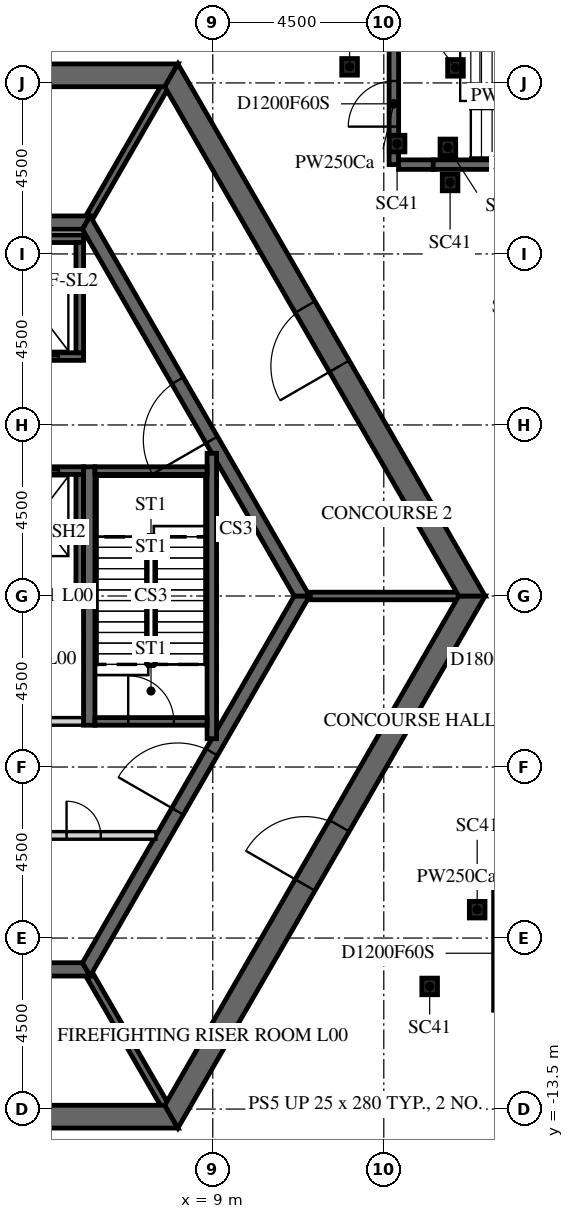
"""IFC4 building model, lengths in metres.
Left out: names, types, materials, properties, quantities, classifications, styles, units other than length and angle.
Written with IfcOpenShell. Run it as: python <this file> out.ifc"""

import sys

from ifc_helpers import new_model, si_unit, direction, frame, frame_2d, origin, origin_2d, place, context, subcontext, project, spatial, polyline, rectangle, i_section, outline, extrude, element, fill, save


model = new_model("IFC4")
c1 = context("Model", 3, precision=1e-05, world=origin(), true_north=direction((0.0, 1.0)))
c2 = subcontext(c1, "Body", "Model", "MODEL_VIEW")
j1 = project(units=[si_unit("LENGTHUNIT", "METRE"), si_unit("PLANEANGLEUNIT", "RADIAN")], contexts=[c1])
p1 = place(None, origin())
s1 = spatial("IfcSite", under=j1, at=p1, CompositionType="ELEMENT")
p2 = place(p1, origin())
s2 = spatial("IfcBuilding", under=s1, at=p2, CompositionType="ELEMENT")
p3 = place(p2, origin())
s3 = spatial("IfcBuildingStorey", under=s2, at=p3, CompositionType="ELEMENT", Elevation=0.0)
for number, where, z_axis, x_axis in (
    (1, (15.957, -8.254, -2.1), (0.0, 0.0, 1.0), (1.0, 0.0, 0.0)),
    (2, (14.707, -10.273, -2.1), (0.0, 0.0, 1.0), (1.0, 0.0, 0.0)),
    (3, (12.6, 13.923, -2.1), (0.0, 0.0, 1.0), (1.0, 0.0, 0.0)),
    (4, (13.85, 11.904, -2.1), (0.0, 0.0, 1.0), (1.0, 0.0, 0.0)),
    (5, (15.186, 11.804, -2.1), (0.0, 0.0, 1.0), (1.0, 0.0, 0.0)),
    (6, (15.386, 13.896, -2.1), (0.0, 0.0, 1.0), (1.0, 0.0, 0.0)),
    (7, (15.245, 10.88, -2.1), (0.0, 0.0, 1.0), (1.0, 0.0, 0.0)),
):
    element("IfcColumn", number, at=place(p3, frame(where, z_axis=z_axis, x_axis=x_axis)), inside=s3, PredefinedType="COLUMN", context=c2, shape_type="SweptSolid", body=[
        extrude(i_section(OverallWidth=0.412, OverallDepth=0.437, WebThickness=0.036, FlangeThickness=0.058, FilletRadius=0.015, at=origin_2d()), origin(), (0.0, 0.0, 1.0), 10.85),
    ])
p4 = place(p3, frame((-7.91, -13.7, -2.1), z_axis=(0.0, 0.0, 1.0), x_axis=(1.0, 0.0, 0.0)))
e8 = element("IfcWall", 8, at=p4, inside=s3, PredefinedType="SHEAR", context=c2, shape_type="SweptSolid", body=[
    extrude(outline(polyline([(-0.173, -0.3), (15.993, -0.3), (15.646, 0.3), (0.173, 0.3), (-0.173, -0.3)])), origin(), (0.0, 0.0, 1.0), 10.85),
])
p5 = place(p4, frame((7.31, 0.0, 2.1)))
e9 = element("IfcOpeningElement", 9, at=p5, cuts=e8, PredefinedType="OPENING", context=c2, shape_type="SweptSolid", body=[
    extrude(rectangle(XDim=1.2, YDim=2.4, at=frame_2d((0.6, 1.2))), frame((0.0, 0.31, 0.0), z_axis=(0.0, -1.0, 0.0), x_axis=(1.0, 0.0, 0.0)), (0.0, 0.0, 1.0), 0.62),
])
p6 = place(p3, frame((7.91, -13.7, -2.1), z_axis=(0.0, 0.0, 1.0), x_axis=(0.499999880136, 0.866025472988, 0.0)))
e10 = element("IfcWall", 10, at=p6, inside=s3, PredefinedType="SHEAR", context=c2, shape_type="SweptSolid", body=[
    extrude(outline(polyline([(-0.173, -0.3), (15.993, -0.3), (15.646, 0.3), (0.173, 0.3), (-0.173, -0.3)])), origin(), (0.0, 0.0, 1.0), 10.85),
])
p7 = place(p6, frame((7.039, 0.0, 2.1)))
e11 = element("IfcOpeningElement", 11, at=p7, cuts=e10, PredefinedType="OPENING", context=c2, shape_type="SweptSolid", body=[
    extrude(rectangle(XDim=1.8, YDim=2.4, at=frame_2d((0.9, 1.2))), frame((0.0, 0.31, 0.0), z_axis=(0.0, -1.0, 0.0), x_axis=(1.0, 0.0, 0.0)), (0.0, 0.0, 1.0), 0.62),
])
p8 = place(p3, frame((15.819, 0.0, -2.1), z_axis=(0.0, 0.0, 1.0), x_axis=(-0.499999880136, 0.866025472988, 0.0)))
e12 = element("IfcWall", 12, at=p8, inside=s3, PredefinedType="SHEAR", context=c2, shape_type="SweptSolid", body=[
    extrude(outline(polyline([(-0.173, -0.3), (15.993, -0.3), (15.646, 0.3), (0.173, 0.3), (-0.173, -0.3)])), origin(), (0.0, 0.0, 1.0), 10.85),
])
p9 = place(p8, frame((6.981, 0.0, 2.1)))
e13 = element("IfcOpeningElement", 13, at=p9, cuts=e12, PredefinedType="OPENING", context=c2, shape_type="SweptSolid", body=[
    extrude(rectangle(XDim=1.8, YDim=2.4, at=frame_2d((0.9, 1.2))), frame((0.0, 0.31, 0.0), z_axis=(0.0, -1.0, 0.0), x_axis=(1.0, 0.0, 0.0)), (0.0, 0.0, 1.0), 0.62),
])
p10 = place(p3, frame((7.91, 13.7, -2.1), z_axis=(0.0, 0.0, 1.0), x_axis=(-1.0, 0.0, 0.0)))
e14 = element("IfcWall", 14, at=p10, inside=s3, PredefinedType="SHEAR", context=c2, shape_type="SweptSolid", body=[
    extrude(outline(polyline([(-0.173, -0.3), (15.993, -0.3), (15.646, 0.3), (0.173, 0.3), (-0.173, -0.3)])), origin(), (0.0, 0.0, 1.0), 10.85),
])
p11 = place(p10, frame((7.31, 0.0, 2.1)))
e15 = element("IfcOpeningElement", 15, at=p11, cuts=e14, PredefinedType="OPENING", context=c2, shape_type="SweptSolid", body=[
    extrude(rectangle(XDim=1.2, YDim=2.4, at=frame_2d((0.6, 1.2))), frame((0.0, 0.31, 0.0), z_axis=(0.0, -1.0, 0.0), x_axis=(1.0, 0.0, 0.0)), (0.0, 0.0, 1.0), 0.62),
])
p12 = place(p3, frame((-5.673, -9.825, -2.1), z_axis=(0.0, 0.0, 1.0), x_axis=(1.0, 0.0, 0.0)))
e16 = element("IfcWall", 16, at=p12, inside=s3, PredefinedType="SHEAR", context=c2, shape_type="SweptSolid", body=[
    extrude(outline(polyline([(-0.101, -0.175), (11.446, -0.175), (11.244, 0.175), (0.101, 0.175), (-0.101, -0.175)])), origin(), (0.0, 0.0, 1.0), 10.85),
])
p13 = place(p3, frame((5.673, -9.825, -2.1), z_axis=(0.0, 0.0, 1.0), x_axis=(0.499995046907, 0.866028263435, 0.0)))
e17 = element("IfcWall", 17, at=p13, inside=s3, PredefinedType="SHEAR", context=c2, shape_type="SweptSolid", body=[
    extrude(outline(polyline([(-0.101, -0.175), (11.446, -0.175), (11.244, 0.175), (0.101, 0.175), (-0.101, -0.175)])), origin(), (0.0, 0.0, 1.0), 10.85),
])
p14 = place(p13, frame((4.801, 0.0, 2.1)))
e18 = element("IfcOpeningElement", 18, at=p14, cuts=e17, PredefinedType="OPENING", context=c2, shape_type="SweptSolid", body=[
    extrude(rectangle(XDim=1.8, YDim=2.4, at=frame_2d((0.9, 1.2))), frame((0.0, 0.185, 0.0), z_axis=(0.0, -1.0, 0.0), x_axis=(1.0, 0.0, 0.0)), (0.0, 0.0, 1.0), 0.37),
])
p15 = place(p3, frame((11.345, 0.0, -2.1), z_axis=(0.0, 0.0, 1.0), x_axis=(-0.499995046907, 0.866028263435, 0.0)))
e19 = element("IfcWall", 19, at=p15, inside=s3, PredefinedType="SHEAR", context=c2, shape_type="SweptSolid", body=[
    extrude(outline(polyline([(-0.101, -0.175), (11.446, -0.175), (11.244, 0.175), (0.101, 0.175), (-0.101, -0.175)])), origin(), (0.0, 0.0, 1.0), 10.85),
])
p16 = place(p15, frame((4.744, 0.0, 2.1)))
e20 = element("IfcOpeningElement", 20, at=p16, cuts=e19, PredefinedType="OPENING", context=c2, shape_type="SweptSolid", body=[
    extrude(rectangle(XDim=1.8, YDim=2.4, at=frame_2d((0.9, 1.2))), frame((0.0, 0.185, 0.0), z_axis=(0.0, -1.0, 0.0), x_axis=(1.0, 0.0, 0.0)), (0.0, 0.0, 1.0), 0.37),
])
p17 = place(p3, frame((5.673, 9.825, -2.1), z_axis=(0.0, 0.0, 1.0), x_axis=(-1.0, 0.0, 0.0)))
e21 = element("IfcWall", 21, at=p17, inside=s3, PredefinedType="SHEAR", context=c2, shape_type="SweptSolid", body=[
    extrude(outline(polyline([(-0.101, -0.175), (11.446, -0.175), (11.244, 0.175), (0.101, 0.175), (-0.101, -0.175)])), origin(), (0.0, 0.0, 1.0), 10.85),
])
p18 = place(p3, frame((-5.6, 6.3, -2.1), z_axis=(0.0, 0.0, 1.0), x_axis=(1.0, 0.0, 0.0)))
e22 = element("IfcWall", 22, at=p18, inside=s3, PredefinedType="SHEAR", context=c2, shape_type="SweptSolid", body=[
    extrude(rectangle(XDim=11.2, YDim=0.2, at=frame_2d((5.6, 0.0))), origin(), (0.0, 0.0, 1.0), 10.85),
])
p19 = place(p18, frame((0.65, 0.0, 2.1)))
e23 = element("IfcOpeningElement", 23, at=p19, cuts=e22, PredefinedType="OPENING", context=c2, shape_type="SweptSolid", body=[
    extrude(rectangle(XDim=1.1, YDim=2.1, at=frame_2d((0.55, 1.05))), frame((0.0, 0.11, 0.0), z_axis=(0.0, -1.0, 0.0), x_axis=(1.0, 0.0, 0.0)), (0.0, 0.0, 1.0), 0.22),
])
p20 = place(p18, frame((2.85, 0.0, 2.1)))
e24 = element("IfcOpeningElement", 24, at=p20, cuts=e22, PredefinedType="OPENING", context=c2, shape_type="SweptSolid", body=[
    extrude(rectangle(XDim=1.1, YDim=2.1, at=frame_2d((0.55, 1.05))), frame((0.0, 0.11, 0.0), z_axis=(0.0, -1.0, 0.0), x_axis=(1.0, 0.0, 0.0)), (0.0, 0.0, 1.0), 0.22),
])
p21 = place(p18, frame((5.05, 0.0, 2.1)))
e25 = element("IfcOpeningElement", 25, at=p21, cuts=e22, PredefinedType="OPENING", context=c2, shape_type="SweptSolid", body=[
    extrude(rectangle(XDim=1.1, YDim=2.1, at=frame_2d((0.55, 1.05))), frame((0.0, 0.11, 0.0), z_axis=(0.0, -1.0, 0.0), x_axis=(1.0, 0.0, 0.0)), (0.0, 0.0, 1.0), 0.22),
])
p22 = place(p18, frame((7.25, 0.0, 2.1)))
e26 = element("IfcOpeningElement", 26, at=p22, cuts=e22, PredefinedType="OPENING", context=c2, shape_type="SweptSolid", body=[
    extrude(rectangle(XDim=1.1, YDim=2.1, at=frame_2d((0.55, 1.05))), frame((0.0, 0.11, 0.0), z_axis=(0.0, -1.0, 0.0), x_axis=(1.0, 0.0, 0.0)), (0.0, 0.0, 1.0), 0.22),
])
p23 = place(p18, frame((9.45, 0.0, 2.1)))
e27 = element("IfcOpeningElement", 27, at=p23, cuts=e22, PredefinedType="OPENING", context=c2, shape_type="SweptSolid", body=[
    extrude(rectangle(XDim=1.1, YDim=2.1, at=frame_2d((0.55, 1.05))), frame((0.0, 0.11, 0.0), z_axis=(0.0, -1.0, 0.0), x_axis=(1.0, 0.0, 0.0)), (0.0, 0.0, 1.0), 0.22),
])
p24 = place(p3, frame((-5.6, 9.4, -2.1), z_axis=(0.0, 0.0, 1.0), x_axis=(1.0, 0.0, 0.0)))
e28 = element("IfcWall", 28, at=p24, inside=s3, PredefinedType="SHEAR", context=c2, shape_type="SweptSolid", body=[
    extrude(rectangle(XDim=11.2, YDim=0.2, at=frame_2d((5.6, 0.0))), origin(), (0.0, 0.0, 1.0), 10.85),
])
p25 = place(p3, frame((5.5, 6.4, -2.1), z_axis=(0.0, 0.0, 1.0), x_axis=(0.0, 1.0, 0.0)))
e29 = element("IfcWall", 29, at=p25, inside=s3, PredefinedType="SHEAR", context=c2, shape_type="SweptSolid", body=[
    extrude(rectangle(XDim=2.9, YDim=0.2, at=frame_2d((1.45, 0.0))), origin(), (0.0, 0.0, 1.0), 10.85),
])
p26 = place(p3, frame((-5.6, 3.3, -2.1), z_axis=(0.0, 0.0, 1.0), x_axis=(1.0, 0.0, 0.0)))
e30 = element("IfcWall", 30, at=p26, inside=s3, PredefinedType="SHEAR", context=c2, shape_type="SweptSolid", body=[
    extrude(rectangle(XDim=11.2, YDim=0.2, at=frame_2d((5.6, 0.0))), origin(), (0.0, 0.0, 1.0), 10.85),
])
p27 = place(p26, frame((0.65, 0.0, 2.1)))
e31 = element("IfcOpeningElement", 31, at=p27, cuts=e30, PredefinedType="OPENING", context=c2, shape_type="SweptSolid", body=[
    extrude(rectangle(XDim=1.1, YDim=2.1, at=frame_2d((0.55, 1.05))), frame((0.0, 0.11, 0.0), z_axis=(0.0, -1.0, 0.0), x_axis=(1.0, 0.0, 0.0)), (0.0, 0.0, 1.0), 0.22),
])
p28 = place(p26, frame((2.85, 0.0, 2.1)))
e32 = element("IfcOpeningElement", 32, at=p28, cuts=e30, PredefinedType="OPENING", context=c2, shape_type="SweptSolid", body=[
    extrude(rectangle(XDim=1.1, YDim=2.1, at=frame_2d((0.55, 1.05))), frame((0.0, 0.11, 0.0), z_axis=(0.0, -1.0, 0.0), x_axis=(1.0, 0.0, 0.0)), (0.0, 0.0, 1.0), 0.22),
])
p29 = place(p26, frame((5.05, 0.0, 2.1)))
e33 = element("IfcOpeningElement", 33, at=p29, cuts=e30, PredefinedType="OPENING", context=c2, shape_type="SweptSolid", body=[
    extrude(rectangle(XDim=1.1, YDim=2.1, at=frame_2d((0.55, 1.05))), frame((0.0, 0.11, 0.0), z_axis=(0.0, -1.0, 0.0), x_axis=(1.0, 0.0, 0.0)), (0.0, 0.0, 1.0), 0.22),
])
p30 = place(p26, frame((7.25, 0.0, 2.1)))
e34 = element("IfcOpeningElement", 34, at=p30, cuts=e30, PredefinedType="OPENING", context=c2, shape_type="SweptSolid", body=[
    extrude(rectangle(XDim=1.1, YDim=2.1, at=frame_2d((0.55, 1.05))), frame((0.0, 0.11, 0.0), z_axis=(0.0, -1.0, 0.0), x_axis=(1.0, 0.0, 0.0)), (0.0, 0.0, 1.0), 0.22),
])
p31 = place(p26, frame((9.45, 0.0, 2.1)))
e35 = element("IfcOpeningElement", 35, at=p31, cuts=e30, PredefinedType="OPENING", context=c2, shape_type="SweptSolid", body=[
    extrude(rectangle(XDim=1.1, YDim=2.1, at=frame_2d((0.55, 1.05))), frame((0.0, 0.11, 0.0), z_axis=(0.0, -1.0, 0.0), x_axis=(1.0, 0.0, 0.0)), (0.0, 0.0, 1.0), 0.22),
])
p32 = place(p3, frame((-5.6, 0.0, -2.1), z_axis=(0.0, 0.0, 1.0), x_axis=(1.0, 0.0, 0.0)))
e36 = element("IfcWall", 36, at=p32, inside=s3, PredefinedType="SHEAR", context=c2, shape_type="SweptSolid", body=[
    extrude(rectangle(XDim=11.2, YDim=0.2, at=frame_2d((5.6, 0.0))), origin(), (0.0, 0.0, 1.0), 10.85),
])
p33 = place(p3, frame((5.5, 0.1, -2.1), z_axis=(0.0, 0.0, 1.0), x_axis=(0.0, 1.0, 0.0)))
e37 = element("IfcWall", 37, at=p33, inside=s3, PredefinedType="SHEAR", context=c2, shape_type="SweptSolid", body=[
    extrude(rectangle(XDim=3.1, YDim=0.2, at=frame_2d((1.55, 0.0))), origin(), (0.0, 0.0, 1.0), 10.85),
])
p34 = place(p3, frame((0.1, -3.3, 0.0), z_axis=(0.0, 0.0, 1.0), x_axis=(1.0, 0.0, 0.0)))
e38 = element("IfcWall", 38, at=p34, inside=s3, PredefinedType="PARTITIONING", context=c2, shape_type="SweptSolid", body=[
    extrude(rectangle(XDim=5.5, YDim=0.2, at=frame_2d((2.75, 0.0))), origin(), (0.0, 0.0, 1.0), 8.75),
])
p35 = place(p34, frame((2.3, 0.0, 0.0)))
e39 = element("IfcOpeningElement", 39, at=p35, cuts=e38, PredefinedType="OPENING", context=c2, shape_type="SweptSolid", body=[
    extrude(rectangle(XDim=0.9, YDim=2.1, at=frame_2d((0.45, 1.05))), frame((0.0, 0.11, 0.0), z_axis=(0.0, -1.0, 0.0), x_axis=(1.0, 0.0, 0.0)), (0.0, 0.0, 1.0), 0.22),
])
p36 = place(p3, frame((3.7, -6.3, 0.0), z_axis=(0.0, 0.0, 1.0), x_axis=(1.0, 0.0, 0.0)))
e40 = element("IfcWall", 40, at=p36, inside=s3, PredefinedType="PARTITIONING", context=c2, shape_type="SweptSolid", body=[
    extrude(rectangle(XDim=3.806, YDim=0.2, at=frame_2d((1.903, 0.0))), origin(), (0.0, 0.0, 1.0), 8.75),
])
p37 = place(p36, frame((1.453, 0.0, 0.0)))
e41 = element("IfcOpeningElement", 41, at=p37, cuts=e40, PredefinedType="OPENING", context=c2, shape_type="SweptSolid", body=[
    extrude(rectangle(XDim=0.9, YDim=2.1, at=frame_2d((0.45, 1.05))), frame((0.0, 0.11, 0.0), z_axis=(0.0, -1.0, 0.0), x_axis=(1.0, 0.0, 0.0)), (0.0, 0.0, 1.0), 0.22),
])
p38 = place(p3, frame((11.547, 0.0, -2.1), z_axis=(0.0, 0.0, 1.0), x_axis=(1.0, 0.0, 0.0)))
e42 = element("IfcWall", 42, at=p38, inside=s3, PredefinedType="SHEAR", context=c2, shape_type="SweptSolid", body=[
    extrude(rectangle(XDim=3.926, YDim=0.2, at=frame_2d((1.963, 0.0))), origin(), (0.0, 0.0, 1.0), 10.85),
])
for number, where, z_axis, x_axis in (
    (43, (5.773, 10.0, -2.1), (0.0, 0.0, 1.0), (0.5, 0.866, 0.0)),
    (44, (5.773, -10.0, -2.1), (0.0, 0.0, 1.0), (0.5, -0.866, 0.0)),
):
    element("IfcWall", number, at=place(p3, frame(where, z_axis=z_axis, x_axis=x_axis)), inside=s3, PredefinedType="SHEAR", context=c2, shape_type="SweptSolid", body=[
        extrude(rectangle(XDim=3.926, YDim=0.2, at=frame_2d((1.963, 0.0))), origin(), (0.0, 0.0, 1.0), 10.85),
    ])
p39 = place(p3, frame((5.75, -3.4, -2.1), z_axis=(0.0, 0.0, 1.0), x_axis=(0.0, 1.0, 0.0)))
e45 = element("IfcWall", 45, at=p39, inside=s3, PredefinedType="SHEAR", context=c2, shape_type="SweptSolid", body=[
    extrude(rectangle(XDim=6.8, YDim=0.3, at=frame_2d((3.4, 0.0))), origin(), (0.0, 0.0, 1.0), 10.85),
])
p40 = place(p3, frame((8.975, -3.755, -2.1), z_axis=(0.0, 0.0, 1.0), x_axis=(0.0, 1.0, 0.0)))
e46 = element("IfcWall", 46, at=p40, inside=s3, PredefinedType="SHEAR", context=c2, shape_type="SweptSolid", body=[
    extrude(rectangle(XDim=7.51, YDim=0.25, at=frame_2d((3.755, 0.0))), origin(), (0.0, 0.0, 1.0), 10.85),
])
p41 = place(p3, frame((5.9, 3.3, -2.1), z_axis=(0.0, 0.0, 1.0), x_axis=(1.0, 0.0, 0.0)))
e47 = element("IfcWall", 47, at=p41, inside=s3, PredefinedType="SHEAR", context=c2, shape_type="SweptSolid", body=[
    extrude(rectangle(XDim=2.95, YDim=0.2, at=frame_2d((1.475, 0.0))), origin(), (0.0, 0.0, 1.0), 10.85),
])
p42 = place(p3, frame((5.9, -3.3, -2.1), z_axis=(0.0, 0.0, 1.0), x_axis=(1.0, 0.0, 0.0)))
e48 = element("IfcWall", 48, at=p42, inside=s3, PredefinedType="SHEAR", context=c2, shape_type="SweptSolid", body=[
    extrude(rectangle(XDim=2.95, YDim=0.2, at=frame_2d((1.475, 0.0))), origin(), (0.0, 0.0, 1.0), 10.85),
])
p43 = place(p42, frame((0.875, 0.0, 2.1)))
e49 = element("IfcOpeningElement", 49, at=p43, cuts=e48, PredefinedType="OPENING", context=c2, shape_type="SweptSolid", body=[
    extrude(rectangle(XDim=1.2, YDim=2.4, at=frame_2d((0.6, 1.2))), frame((0.0, 0.11, 0.0), z_axis=(0.0, -1.0, 0.0), x_axis=(1.0, 0.0, 0.0)), (0.0, 0.0, 1.0), 0.22),
])
p44 = place(p3, frame((13.765, 11.35, 0.0), z_axis=(0.0, 0.0, 1.0), x_axis=(0.0, 1.0, 0.0)))
e50 = element("IfcWall", 50, at=p44, inside=s3, PredefinedType="PARTITIONING", context=c2, shape_type="SweptSolid", body=[
    extrude(rectangle(XDim=3.2, YDim=0.25, at=frame_2d((1.6, 0.0))), origin(), (0.0, 0.0, 1.0), 8.75),
])
p45 = place(p44, frame((1.0, 0.0, 0.0)))
e51 = element("IfcOpeningElement", 51, at=p45, cuts=e50, PredefinedType="OPENING", context=c2, shape_type="SweptSolid", body=[
    extrude(rectangle(XDim=1.2, YDim=2.1, at=frame_2d((0.6, 1.05))), frame((0.0, 0.135, 0.0), z_axis=(0.0, -1.0, 0.0), x_axis=(1.0, 0.0, 0.0)), (0.0, 0.0, 1.0), 0.27),
])
p46 = place(p3, frame((14.821, 11.35, 0.0), z_axis=(0.0, 0.0, 1.0), x_axis=(-1.0, 0.0, 0.0)))
e52 = element("IfcWall", 52, at=p46, inside=s3, PredefinedType="PARTITIONING", context=c2, shape_type="SweptSolid", body=[
    extrude(rectangle(XDim=0.931, YDim=0.25, at=frame_2d((0.466, 0.0))), origin(), (0.0, 0.0, 1.0), 8.75),
])
p47 = place(p3, frame((16.515, -7.7, 0.0), z_axis=(0.0, 0.0, 1.0), x_axis=(0.0, -1.0, 0.0)))
e53 = element("IfcWall", 53, at=p47, inside=s3, PredefinedType="PARTITIONING", context=c2, shape_type="SweptSolid", body=[
    extrude(rectangle(XDim=3.2, YDim=0.25, at=frame_2d((1.6, 0.0))), origin(), (0.0, 0.0, 1.0), 8.75),
])
p48 = place(p47, frame((1.1, 0.0, 0.0)))
e54 = element("IfcOpeningElement", 54, at=p48, cuts=e53, PredefinedType="OPENING", context=c2, shape_type="SweptSolid", body=[
    extrude(rectangle(XDim=1.2, YDim=2.1, at=frame_2d((0.6, 1.05))), frame((0.0, 0.135, 0.0), z_axis=(0.0, -1.0, 0.0), x_axis=(1.0, 0.0, 0.0)), (0.0, 0.0, 1.0), 0.27),
])
p49 = place(p3, frame((20.017, 11.35, 0.0), z_axis=(0.0, 0.0, 1.0), x_axis=(-1.0, 0.0, 0.0)))
e55 = element("IfcWall", 55, at=p49, inside=s3, PredefinedType="PARTITIONING", context=c2, shape_type="SweptSolid", body=[
    extrude(rectangle(XDim=5.218, YDim=0.25, at=frame_2d((2.609, 0.0))), origin(), (0.0, 0.0, 1.0), 8.75),
])
p50 = place(p9, origin())
e56 = element("IfcDoor", 56, at=p50, inside=s3, OperationType="DOUBLE_DOOR_SINGLE_SWING", PredefinedType="DOOR", context=c2, shape_type="SweptSolid", body=[
    extrude(rectangle(XDim=1.8, YDim=2.4, at=frame_2d((0.9, 1.2))), frame((0.0, 0.025, 0.0), z_axis=(0.0, -1.0, 0.0), x_axis=(1.0, 0.0, 0.0)), (0.0, 0.0, 1.0), 0.05),
])
fill(e13, e56)
p51 = place(p7, origin())
e57 = element("IfcDoor", 57, at=p51, inside=s3, OperationType="DOUBLE_DOOR_SINGLE_SWING", PredefinedType="DOOR", context=c2, shape_type="SweptSolid", body=[
    extrude(rectangle(XDim=1.8, YDim=2.4, at=frame_2d((0.9, 1.2))), frame((0.0, 0.025, 0.0), z_axis=(0.0, -1.0, 0.0), x_axis=(1.0, 0.0, 0.0)), (0.0, 0.0, 1.0), 0.05),
])
fill(e11, e57)
p52 = place(p16, origin())
e58 = element("IfcDoor", 58, at=p52, inside=s3, OperationType="DOUBLE_DOOR_SINGLE_SWING", PredefinedType="DOOR", context=c2, shape_type="SweptSolid", body=[
    extrude(rectangle(XDim=1.8, YDim=2.4, at=frame_2d((0.9, 1.2))), frame((0.0, 0.025, 0.0), z_axis=(0.0, -1.0, 0.0), x_axis=(1.0, 0.0, 0.0)), (0.0, 0.0, 1.0), 0.05),
])
fill(e20, e58)
p53 = place(p14, origin())
e59 = element("IfcDoor", 59, at=p53, inside=s3, OperationType="DOUBLE_DOOR_SINGLE_SWING", PredefinedType="DOOR", context=c2, shape_type="SweptSolid", body=[
    extrude(rectangle(XDim=1.8, YDim=2.4, at=frame_2d((0.9, 1.2))), frame((0.0, 0.025, 0.0), z_axis=(0.0, -1.0, 0.0), x_axis=(1.0, 0.0, 0.0)), (0.0, 0.0, 1.0), 0.05),
])
fill(e18, e59)
p54 = place(p37, origin())
e60 = element("IfcDoor", 60, at=p54, inside=s3, OperationType="SINGLE_SWING_LEFT", PredefinedType="DOOR", context=c2, shape_type="SweptSolid", body=[
    extrude(rectangle(XDim=0.9, YDim=2.1, at=frame_2d((0.45, 1.05))), frame((0.0, 0.025, 0.0), z_axis=(0.0, -1.0, 0.0), x_axis=(1.0, 0.0, 0.0)), (0.0, 0.0, 1.0), 0.05),
])
fill(e41, e60)
p55 = place(p43, origin())
e61 = element("IfcDoor", 61, at=p55, inside=s3, OperationType="SINGLE_SWING_LEFT", PredefinedType="DOOR", context=c2, shape_type="SweptSolid", body=[
    extrude(rectangle(XDim=1.2, YDim=2.4, at=frame_2d((0.6, 1.2))), frame((0.0, 0.025, 0.0), z_axis=(0.0, -1.0, 0.0), x_axis=(1.0, 0.0, 0.0)), (0.0, 0.0, 1.0), 0.05),
])
fill(e49, e61)
p56 = place(p23, origin())
e62 = element("IfcDoor", 62, at=p56, inside=s3, OperationType="SLIDING_TO_LEFT", PredefinedType="DOOR", context=c2, shape_type="SweptSolid", body=[
    extrude(rectangle(XDim=1.1, YDim=2.1, at=frame_2d((0.55, 1.05))), frame((0.0, 0.025, 0.0), z_axis=(0.0, -1.0, 0.0), x_axis=(1.0, 0.0, 0.0)), (0.0, 0.0, 1.0), 0.05),
])
fill(e27, e62)
p57 = place(p31, origin())
e63 = element("IfcDoor", 63, at=p57, inside=s3, OperationType="SLIDING_TO_LEFT", PredefinedType="DOOR", context=c2, shape_type="SweptSolid", body=[
    extrude(rectangle(XDim=1.1, YDim=2.1, at=frame_2d((0.55, 1.05))), frame((0.0, 0.025, 0.0), z_axis=(0.0, -1.0, 0.0), x_axis=(1.0, 0.0, 0.0)), (0.0, 0.0, 1.0), 0.05),
])
fill(e35, e63)
p58 = place(p45, origin())
e64 = element("IfcDoor", 64, at=p58, inside=s3, OperationType="SINGLE_SWING_RIGHT", PredefinedType="DOOR", context=c2, shape_type="SweptSolid", body=[
    extrude(rectangle(XDim=1.2, YDim=2.1, at=frame_2d((0.6, 1.05))), frame((0.0, 0.025, 0.0), z_axis=(0.0, -1.0, 0.0), x_axis=(1.0, 0.0, 0.0)), (0.0, 0.0, 1.0), 0.05),
])
fill(e51, e64)
save(model, sys.argv[1])
